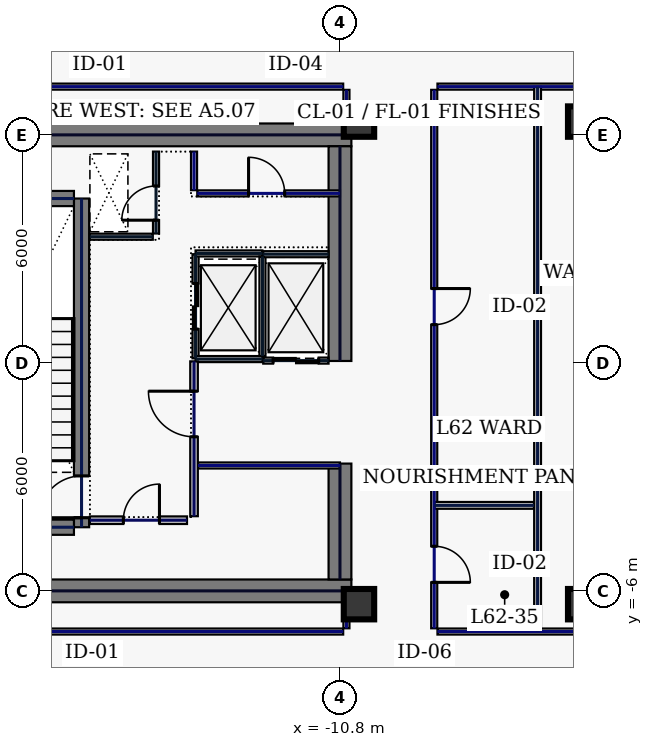
"""IFC4 building model, lengths in metres.
Left out: names, types, materials, properties, quantities, classifications, styles, units other than length and angle.
Written with IfcOpenShell. Run it as: python <this file> out.ifc"""

import sys

from ifc_helpers import new_model, si_unit, direction, frame, frame_2d, origin, origin_2d, place, context, subcontext, project, spatial, rectangle, hollow_rectangle, extrude, element, fill, save


model = new_model("IFC4")
c1 = context("Model", 3, precision=1e-05, world=origin(), true_north=direction((0.0, 1.0)))
c2 = subcontext(c1, "Body", "Model", "MODEL_VIEW")
j1 = project(units=[si_unit("LENGTHUNIT", "METRE"), si_unit("PLANEANGLEUNIT", "RADIAN")], contexts=[c1])
p1 = place(None, origin())
s1 = spatial("IfcSite", under=j1, at=p1, CompositionType="ELEMENT")
p2 = place(p1, origin())
s2 = spatial("IfcBuilding", under=s1, at=p2, CompositionType="ELEMENT")
p3 = place(p2, frame((0.0, 0.0, 267.0)))
s3 = spatial("IfcBuildingStorey", under=s2, at=p3, CompositionType="ELEMENT", Elevation=267.0)
for number, where, z_axis, x_axis in (
    (1, (-22.0, 6.0, 0.0), (0.0, 0.0, 1.0), (1.0, 0.0, 0.0)),
    (2, (-22.0, -6.0, 0.0), (0.0, 0.0, 1.0), (1.0, 0.0, 0.0)),
):
    element("IfcWall", number, at=place(p3, frame(where, z_axis=z_axis, x_axis=x_axis)), inside=s3, PredefinedType="SHEAR", context=c2, shape_type="SweptSolid", body=[
        extrude(rectangle(XDim=11.5, YDim=0.6, at=frame_2d((5.75, 0.0))), origin(), (0.0, 0.0, 1.0), 3.68),
    ])
p4 = place(p3, frame((-10.8, -5.7, 0.0), z_axis=(0.0, 0.0, 1.0), x_axis=(0.0, 1.0, 0.0)))
e3 = element("IfcWall", 3, at=p4, inside=s3, PredefinedType="SHEAR", context=c2, shape_type="SweptSolid", body=[
    extrude(rectangle(XDim=3.05, YDim=0.6, at=frame_2d((1.525, 0.0))), origin(), (0.0, 0.0, 1.0), 3.68),
])
p5 = place(p3, frame((-10.8, 0.05, 0.0), z_axis=(0.0, 0.0, 1.0), x_axis=(0.0, 1.0, 0.0)))
e4 = element("IfcWall", 4, at=p5, inside=s3, PredefinedType="SHEAR", context=c2, shape_type="SweptSolid", body=[
    extrude(rectangle(XDim=5.65, YDim=0.6, at=frame_2d((2.825, 0.0))), origin(), (0.0, 0.0, 1.0), 3.68),
])
p6 = place(p3, frame((-17.6, -4.325, 0.0), z_axis=(0.0, 0.0, 1.0), x_axis=(0.0, 1.0, 0.0)))
e5 = element("IfcWall", 5, at=p6, inside=s3, PredefinedType="SHEAR", context=c2, shape_type="SweptSolid", body=[
    extrude(rectangle(XDim=8.65, YDim=0.4, at=frame_2d((4.325, 0.0))), origin(), (0.0, 0.0, 1.0), 3.68),
])
p7 = place(p6, frame((0.25, 0.0, 0.0)))
e6 = element("IfcOpeningElement", 6, at=p7, cuts=e5, PredefinedType="OPENING", context=c2, shape_type="SweptSolid", body=[
    extrude(rectangle(XDim=1.1, YDim=2.2, at=frame_2d((0.55, 1.1))), frame((0.0, 0.21, 0.0), z_axis=(0.0, -1.0, 0.0), x_axis=(1.0, 0.0, 0.0)), (0.0, 0.0, 1.0), 0.42),
])
for number, where, z_axis, x_axis in (
    (7, (-21.2, -4.325, 0.0), (0.0, 0.0, 1.0), (1.0, 0.0, 0.0)),
    (8, (-21.2, 4.325, 0.0), (0.0, 0.0, 1.0), (1.0, 0.0, 0.0)),
):
    element("IfcWall", number, at=place(p3, frame(where, z_axis=z_axis, x_axis=x_axis)), inside=s3, PredefinedType="SHEAR", context=c2, shape_type="SweptSolid", body=[
        extrude(rectangle(XDim=3.4, YDim=0.4, at=frame_2d((1.7, 0.0))), origin(), (0.0, 0.0, 1.0), 3.68),
    ])
for number, where, z_axis, x_axis in (
    (9, (-10.3, -6.35, 0.0), (0.0, 0.0, 1.0), (1.0, 0.0, 0.0)),
    (10, (-10.3, 6.35, 0.0), (0.0, 0.0, 1.0), (1.0, 0.0, 0.0)),
    (11, (-4.4, -6.35, 0.0), (0.0, 0.0, 1.0), (1.0, 0.0, 0.0)),
    (12, (-4.4, 6.35, 0.0), (0.0, 0.0, 1.0), (1.0, 0.0, 0.0)),
):
    element("IfcColumn", number, at=place(p3, frame(where, z_axis=z_axis, x_axis=x_axis)), inside=s3, PredefinedType="COLUMN", context=c2, shape_type="SweptSolid", body=[
        extrude(hollow_rectangle(XDim=0.8, YDim=0.8, WallThickness=0.036, at=origin_2d()), origin(), (0.0, 0.0, 1.0), 3.68),
    ])
p8 = place(p3, frame((-14.6, 0.12, 0.0), z_axis=(0.0, 0.0, 1.0), x_axis=(0.0, 1.0, 0.0)))
e13 = element("IfcWall", 13, at=p8, inside=s3, PredefinedType="PARTITIONING", context=c2, shape_type="SweptSolid", body=[
    extrude(rectangle(XDim=2.74, YDim=0.16, at=frame_2d((1.37, 0.0))), origin(), (0.0, 0.0, 1.0), 3.68),
])
p9 = place(p8, frame((0.77, 0.0, 0.0)))
e14 = element("IfcOpeningElement", 14, at=p9, cuts=e13, PredefinedType="OPENING", context=c2, shape_type="SweptSolid", body=[
    extrude(rectangle(XDim=1.2, YDim=2.2, at=frame_2d((0.6, 1.1))), frame((0.0, 0.09, 0.0), z_axis=(0.0, -1.0, 0.0), x_axis=(1.0, 0.0, 0.0)), (0.0, 0.0, 1.0), 0.18),
])
for number, where, z_axis, x_axis in (
    (15, (-14.6, 0.1, 0.0), (0.0, 0.0, 1.0), (1.0, 0.0, 0.0)),
    (16, (-14.6, 2.88, 0.0), (0.0, 0.0, 1.0), (1.0, 0.0, 0.0)),
):
    element("IfcWall", number, at=place(p3, frame(where, z_axis=z_axis, x_axis=x_axis)), inside=s3, PredefinedType="PARTITIONING", context=c2, shape_type="SweptSolid", body=[
        extrude(rectangle(XDim=1.76, YDim=0.16, at=frame_2d((0.88, 0.0))), origin(), (0.0, 0.0, 1.0), 3.68),
    ])
p10 = place(p3, frame((-12.84, 0.18, 0.0), z_axis=(0.0, 0.0, 1.0), x_axis=(0.0, 1.0, 0.0)))
e17 = element("IfcWall", 17, at=p10, inside=s3, PredefinedType="PARTITIONING", context=c2, shape_type="SweptSolid", body=[
    extrude(rectangle(XDim=2.62, YDim=0.16, at=frame_2d((1.31, 0.0))), origin(), (0.0, 0.0, 1.0), 3.68),
])
p11 = place(p3, frame((-12.82, 0.06, 0.0), z_axis=(0.0, 0.0, 1.0), x_axis=(1.0, 0.0, 0.0)))
e18 = element("IfcWall", 18, at=p11, inside=s3, PredefinedType="PARTITIONING", context=c2, shape_type="SweptSolid", body=[
    extrude(rectangle(XDim=1.72, YDim=0.16, at=frame_2d((0.86, 0.0))), origin(), (0.0, 0.0, 1.0), 3.68),
])
p12 = place(p11, frame((0.26, 0.0, 0.0)))
e19 = element("IfcOpeningElement", 19, at=p12, cuts=e18, PredefinedType="OPENING", context=c2, shape_type="SweptSolid", body=[
    extrude(rectangle(XDim=1.2, YDim=2.2, at=frame_2d((0.6, 1.1))), frame((0.0, 0.09, 0.0), z_axis=(0.0, -1.0, 0.0), x_axis=(1.0, 0.0, 0.0)), (0.0, 0.0, 1.0), 0.18),
])
p13 = place(p3, frame((-12.82, 2.86, 0.0), z_axis=(0.0, 0.0, 1.0), x_axis=(1.0, 0.0, 0.0)))
e20 = element("IfcWall", 20, at=p13, inside=s3, PredefinedType="PARTITIONING", context=c2, shape_type="SweptSolid", body=[
    extrude(rectangle(XDim=1.72, YDim=0.16, at=frame_2d((0.86, 0.0))), origin(), (0.0, 0.0, 1.0), 3.68),
])
p14 = place(p3, frame((-15.64, 3.405, 0.0), z_axis=(0.0, 0.0, 1.0), x_axis=(0.0, 1.0, 0.0)))
e21 = element("IfcWall", 21, at=p14, inside=s3, PredefinedType="PARTITIONING", context=c2, shape_type="SweptSolid", body=[
    extrude(rectangle(XDim=2.155, YDim=0.16, at=frame_2d((1.078, 0.0))), origin(), (0.0, 0.0, 1.0), 3.68),
])
p15 = place(p14, frame((0.35, 0.0, 0.0)))
e22 = element("IfcOpeningElement", 22, at=p15, cuts=e21, PredefinedType="OPENING", context=c2, shape_type="SweptSolid", body=[
    extrude(rectangle(XDim=0.9, YDim=2.2, at=frame_2d((0.45, 1.1))), frame((0.0, 0.09, 0.0), z_axis=(0.0, -1.0, 0.0), x_axis=(1.0, 0.0, 0.0)), (0.0, 0.0, 1.0), 0.18),
])
p16 = place(p3, frame((-17.38, 3.32, 0.0), z_axis=(0.0, 0.0, 1.0), x_axis=(1.0, 0.0, 0.0)))
e23 = element("IfcWall", 23, at=p16, inside=s3, PredefinedType="PARTITIONING", context=c2, shape_type="SweptSolid", body=[
    extrude(rectangle(XDim=1.655, YDim=0.16, at=frame_2d((0.827, 0.0))), origin(), (0.0, 0.0, 1.0), 3.68),
])
p17 = place(p3, frame((-17.38, -4.14, 0.0), z_axis=(0.0, 0.0, 1.0), x_axis=(1.0, 0.0, 0.0)))
e24 = element("IfcWall", 24, at=p17, inside=s3, PredefinedType="SOLIDWALL", context=c2, shape_type="SweptSolid", body=[
    extrude(rectangle(XDim=2.555, YDim=0.2, at=frame_2d((1.277, 0.0))), origin(), (0.0, 0.0, 1.0), 3.68),
])
p18 = place(p17, frame((0.88, 0.0, 0.0)))
e25 = element("IfcOpeningElement", 25, at=p18, cuts=e24, PredefinedType="OPENING", context=c2, shape_type="SweptSolid", body=[
    extrude(rectangle(XDim=0.95, YDim=2.2, at=frame_2d((0.475, 1.1))), frame((0.0, 0.11, 0.0), z_axis=(0.0, -1.0, 0.0), x_axis=(1.0, 0.0, 0.0)), (0.0, 0.0, 1.0), 0.22),
])
p19 = place(p3, frame((-14.535, -2.7, 0.0), z_axis=(0.0, 0.0, 1.0), x_axis=(1.0, 0.0, 0.0)))
e26 = element("IfcWall", 26, at=p19, inside=s3, PredefinedType="PARTITIONING", context=c2, shape_type="SweptSolid", body=[
    extrude(rectangle(XDim=3.735, YDim=0.16, at=frame_2d((1.867, 0.0))), origin(), (0.0, 0.0, 1.0), 3.68),
])
p20 = place(p3, frame((-14.555, 4.46, 0.0), z_axis=(0.0, 0.0, 1.0), x_axis=(1.0, 0.0, 0.0)))
e27 = element("IfcWall", 27, at=p20, inside=s3, PredefinedType="PARTITIONING", context=c2, shape_type="SweptSolid", body=[
    extrude(rectangle(XDim=3.755, YDim=0.16, at=frame_2d((1.877, 0.0))), origin(), (0.0, 0.0, 1.0), 3.68),
])
p21 = place(p20, frame((1.35, 0.0, 0.0)))
e28 = element("IfcOpeningElement", 28, at=p21, cuts=e27, PredefinedType="OPENING", context=c2, shape_type="SweptSolid", body=[
    extrude(rectangle(XDim=0.95, YDim=2.2, at=frame_2d((0.475, 1.1))), frame((0.0, 0.09, 0.0), z_axis=(0.0, -1.0, 0.0), x_axis=(1.0, 0.0, 0.0)), (0.0, 0.0, 1.0), 0.18),
])
p22 = place(p3, frame((-14.64, 4.545, 0.0), z_axis=(0.0, 0.0, 1.0), x_axis=(0.0, 1.0, 0.0)))
e29 = element("IfcWall", 29, at=p22, inside=s3, PredefinedType="PARTITIONING", context=c2, shape_type="SweptSolid", body=[
    extrude(rectangle(XDim=1.015, YDim=0.16, at=frame_2d((0.508, 0.0))), origin(), (0.0, 0.0, 1.0), 3.68),
])
p23 = place(p3, frame((-14.64, -4.035, 0.0), z_axis=(0.0, 0.0, 1.0), x_axis=(0.0, 1.0, 0.0)))
e30 = element("IfcWall", 30, at=p23, inside=s3, PredefinedType="SOLIDWALL", context=c2, shape_type="SweptSolid", body=[
    extrude(rectangle(XDim=4.075, YDim=0.2, at=frame_2d((2.038, 0.0))), origin(), (0.0, 0.0, 1.0), 3.68),
])
p24 = place(p23, frame((2.09, 0.0, 0.0)))
e31 = element("IfcOpeningElement", 31, at=p24, cuts=e30, PredefinedType="OPENING", context=c2, shape_type="SweptSolid", body=[
    extrude(rectangle(XDim=1.2, YDim=2.2, at=frame_2d((0.6, 1.1))), frame((0.0, 0.11, 0.0), z_axis=(0.0, -1.0, 0.0), x_axis=(1.0, 0.0, 0.0)), (0.0, 0.0, 1.0), 0.22),
])
p25 = place(p3, frame((-3.965, 7.27, 0.0), z_axis=(0.0, 0.0, 1.0), x_axis=(-1.0, 0.0, 0.0)))
e32 = element("IfcWall", 32, at=p25, inside=s3, PredefinedType="PARTITIONING", context=c2, shape_type="SweptSolid", body=[
    extrude(rectangle(XDim=4.27, YDim=0.16, at=frame_2d((2.135, 0.0))), origin(), (0.0, 0.0, 1.0), 3.68),
])
p26 = place(p3, frame((-8.32, 7.185, 0.0), z_axis=(0.0, 0.0, 1.0), x_axis=(0.0, -1.0, 0.0)))
e33 = element("IfcWall", 33, at=p26, inside=s3, PredefinedType="PARTITIONING", context=c2, shape_type="SweptSolid", body=[
    extrude(rectangle(XDim=14.17, YDim=0.16, at=frame_2d((7.085, 0.0))), origin(), (0.0, 0.0, 1.0), 3.68),
])
p27 = place(p26, frame((12.011, 0.0, 0.0)))
e34 = element("IfcOpeningElement", 34, at=p27, cuts=e33, PredefinedType="OPENING", context=c2, shape_type="SweptSolid", body=[
    extrude(rectangle(XDim=0.95, YDim=2.2, at=frame_2d((0.475, 1.1))), frame((0.0, 0.09, 0.0), z_axis=(0.0, -1.0, 0.0), x_axis=(1.0, 0.0, 0.0)), (0.0, 0.0, 1.0), 0.18),
])
p28 = place(p26, frame((5.229, 0.0, 0.0)))
e35 = element("IfcOpeningElement", 35, at=p28, cuts=e33, PredefinedType="OPENING", context=c2, shape_type="SweptSolid", body=[
    extrude(rectangle(XDim=0.95, YDim=2.2, at=frame_2d((0.475, 1.1))), frame((0.0, 0.09, 0.0), z_axis=(0.0, -1.0, 0.0), x_axis=(1.0, 0.0, 0.0)), (0.0, 0.0, 1.0), 0.18),
])
p29 = place(p3, frame((-8.235, -7.07, 0.0), z_axis=(0.0, 0.0, 1.0), x_axis=(1.0, 0.0, 0.0)))
e36 = element("IfcWall", 36, at=p29, inside=s3, PredefinedType="PARTITIONING", context=c2, shape_type="SweptSolid", body=[
    extrude(rectangle(XDim=4.27, YDim=0.16, at=frame_2d((2.135, 0.0))), origin(), (0.0, 0.0, 1.0), 3.68),
])
p30 = place(p3, frame((-10.63, -6.985, 0.0), z_axis=(0.0, 0.0, 1.0), x_axis=(0.0, 1.0, 0.0)))
e37 = element("IfcWall", 37, at=p30, inside=s3, PredefinedType="PARTITIONING", context=c2, shape_type="SweptSolid", body=[
    extrude(rectangle(XDim=0.565, YDim=0.16, at=frame_2d((0.283, 0.0))), origin(), (0.0, 0.0, 1.0), 3.68),
])
p31 = place(p3, frame((-10.63, 6.42, 0.0), z_axis=(0.0, 0.0, 1.0), x_axis=(0.0, 1.0, 0.0)))
e38 = element("IfcWall", 38, at=p31, inside=s3, PredefinedType="PARTITIONING", context=c2, shape_type="SweptSolid", body=[
    extrude(rectangle(XDim=0.765, YDim=0.16, at=frame_2d((0.383, 0.0))), origin(), (0.0, 0.0, 1.0), 1.475),
])
for number, where, z_axis, x_axis in (
    (39, (-10.715, 7.27, 0.0), (0.0, 0.0, 1.0), (-1.0, 0.0, 0.0)),
    (40, (-22.585, -7.07, 0.0), (0.0, 0.0, 1.0), (1.0, 0.0, 0.0)),
):
    element("IfcWall", number, at=place(p3, frame(where, z_axis=z_axis, x_axis=x_axis)), inside=s3, PredefinedType="PARTITIONING", context=c2, shape_type="SweptSolid", body=[
        extrude(rectangle(XDim=11.87, YDim=0.16, at=frame_2d((5.935, 0.0))), origin(), (0.0, 0.0, 1.0), 3.68),
    ])
p32 = place(p3, frame((-5.6, -7.065, 0.0), z_axis=(0.0, 0.0, 1.0), x_axis=(0.0, 1.0, 0.0)))
e41 = element("IfcWall", 41, at=p32, inside=s3, PredefinedType="PARTITIONING", context=c2, shape_type="SweptSolid", body=[
    extrude(rectangle(XDim=14.33, YDim=0.18, at=frame_2d((7.165, 0.0))), origin(), (0.0, 0.0, 1.0), 3.68),
])
p33 = place(p3, frame((-8.315, -3.75, 0.0), z_axis=(0.0, 0.0, 1.0), x_axis=(1.0, 0.0, 0.0)))
e42 = element("IfcWall", 42, at=p33, inside=s3, PredefinedType="PARTITIONING", context=c2, shape_type="SweptSolid", body=[
    extrude(rectangle(XDim=2.62, YDim=0.18, at=frame_2d((1.31, 0.0))), origin(), (0.0, 0.0, 1.0), 3.68),
])
p34 = place(p7, origin())
e43 = element("IfcDoor", 43, at=p34, inside=s3, OperationType="SINGLE_SWING_LEFT", PredefinedType="DOOR", context=c2, shape_type="SweptSolid", body=[
    extrude(rectangle(XDim=1.1, YDim=2.2, at=frame_2d((0.55, 1.1))), frame((0.0, 0.025, 0.0), z_axis=(0.0, -1.0, 0.0), x_axis=(1.0, 0.0, 0.0)), (0.0, 0.0, 1.0), 0.05),
])
fill(e6, e43)
p35 = place(p9, origin())
e44 = element("IfcDoor", 44, at=p35, inside=s3, OperationType="SLIDING_TO_LEFT", PredefinedType="DOOR", context=c2, shape_type="SweptSolid", body=[
    extrude(rectangle(XDim=1.2, YDim=2.2, at=frame_2d((0.6, 1.1))), frame((0.0, 0.025, 0.0), z_axis=(0.0, -1.0, 0.0), x_axis=(1.0, 0.0, 0.0)), (0.0, 0.0, 1.0), 0.05),
])
fill(e14, e44)
p36 = place(p12, origin())
e45 = element("IfcDoor", 45, at=p36, inside=s3, OperationType="SLIDING_TO_LEFT", PredefinedType="DOOR", context=c2, shape_type="SweptSolid", body=[
    extrude(rectangle(XDim=1.2, YDim=2.2, at=frame_2d((0.6, 1.1))), frame((0.0, 0.025, 0.0), z_axis=(0.0, -1.0, 0.0), x_axis=(1.0, 0.0, 0.0)), (0.0, 0.0, 1.0), 0.05),
])
fill(e19, e45)
p37 = place(p15, origin())
e46 = element("IfcDoor", 46, at=p37, inside=s3, OperationType="SINGLE_SWING_LEFT", PredefinedType="DOOR", context=c2, shape_type="SweptSolid", body=[
    extrude(rectangle(XDim=0.9, YDim=2.2, at=frame_2d((0.45, 1.1))), frame((0.0, 0.025, 0.0), z_axis=(0.0, -1.0, 0.0), x_axis=(1.0, 0.0, 0.0)), (0.0, 0.0, 1.0), 0.05),
])
fill(e22, e46)
p38 = place(p18, origin())
e47 = element("IfcDoor", 47, at=p38, inside=s3, OperationType="SINGLE_SWING_RIGHT", PredefinedType="DOOR", context=c2, shape_type="SweptSolid", body=[
    extrude(rectangle(XDim=0.95, YDim=2.2, at=frame_2d((0.475, 1.1))), frame((0.0, 0.025, 0.0), z_axis=(0.0, -1.0, 0.0), x_axis=(1.0, 0.0, 0.0)), (0.0, 0.0, 1.0), 0.05),
])
fill(e25, e47)
p39 = place(p21, origin())
e48 = element("IfcDoor", 48, at=p39, inside=s3, OperationType="SINGLE_SWING_LEFT", PredefinedType="DOOR", context=c2, shape_type="SweptSolid", body=[
    extrude(rectangle(XDim=0.95, YDim=2.2, at=frame_2d((0.475, 1.1))), frame((0.0, 0.025, 0.0), z_axis=(0.0, -1.0, 0.0), x_axis=(1.0, 0.0, 0.0)), (0.0, 0.0, 1.0), 0.05),
])
fill(e28, e48)
p40 = place(p24, origin())
e49 = element("IfcDoor", 49, at=p40, inside=s3, OperationType="SINGLE_SWING_RIGHT", PredefinedType="DOOR", context=c2, shape_type="SweptSolid", body=[
    extrude(rectangle(XDim=1.2, YDim=2.2, at=frame_2d((0.6, 1.1))), frame((0.0, 0.025, 0.0), z_axis=(0.0, -1.0, 0.0), x_axis=(1.0, 0.0, 0.0)), (0.0, 0.0, 1.0), 0.05),
])
fill(e31, e49)
p41 = place(p27, origin())
e50 = element("IfcDoor", 50, at=p41, inside=s3, OperationType="SINGLE_SWING_RIGHT", PredefinedType="DOOR", context=c2, shape_type="SweptSolid", body=[
    extrude(rectangle(XDim=0.95, YDim=2.2, at=frame_2d((0.475, 1.1))), frame((0.0, 0.025, 0.0), z_axis=(0.0, -1.0, 0.0), x_axis=(1.0, 0.0, 0.0)), (0.0, 0.0, 1.0), 0.05),
])
fill(e34, e50)
p42 = place(p28, origin())
e51 = element("IfcDoor", 51, at=p42, inside=s3, OperationType="SINGLE_SWING_LEFT", PredefinedType="DOOR", context=c2, shape_type="SweptSolid", body=[
    extrude(rectangle(XDim=0.95, YDim=2.2, at=frame_2d((0.475, 1.1))), frame((0.0, 0.025, 0.0), z_axis=(0.0, -1.0, 0.0), x_axis=(1.0, 0.0, 0.0)), (0.0, 0.0, 1.0), 0.05),
])
fill(e35, e51)
save(model, sys.argv[1])
